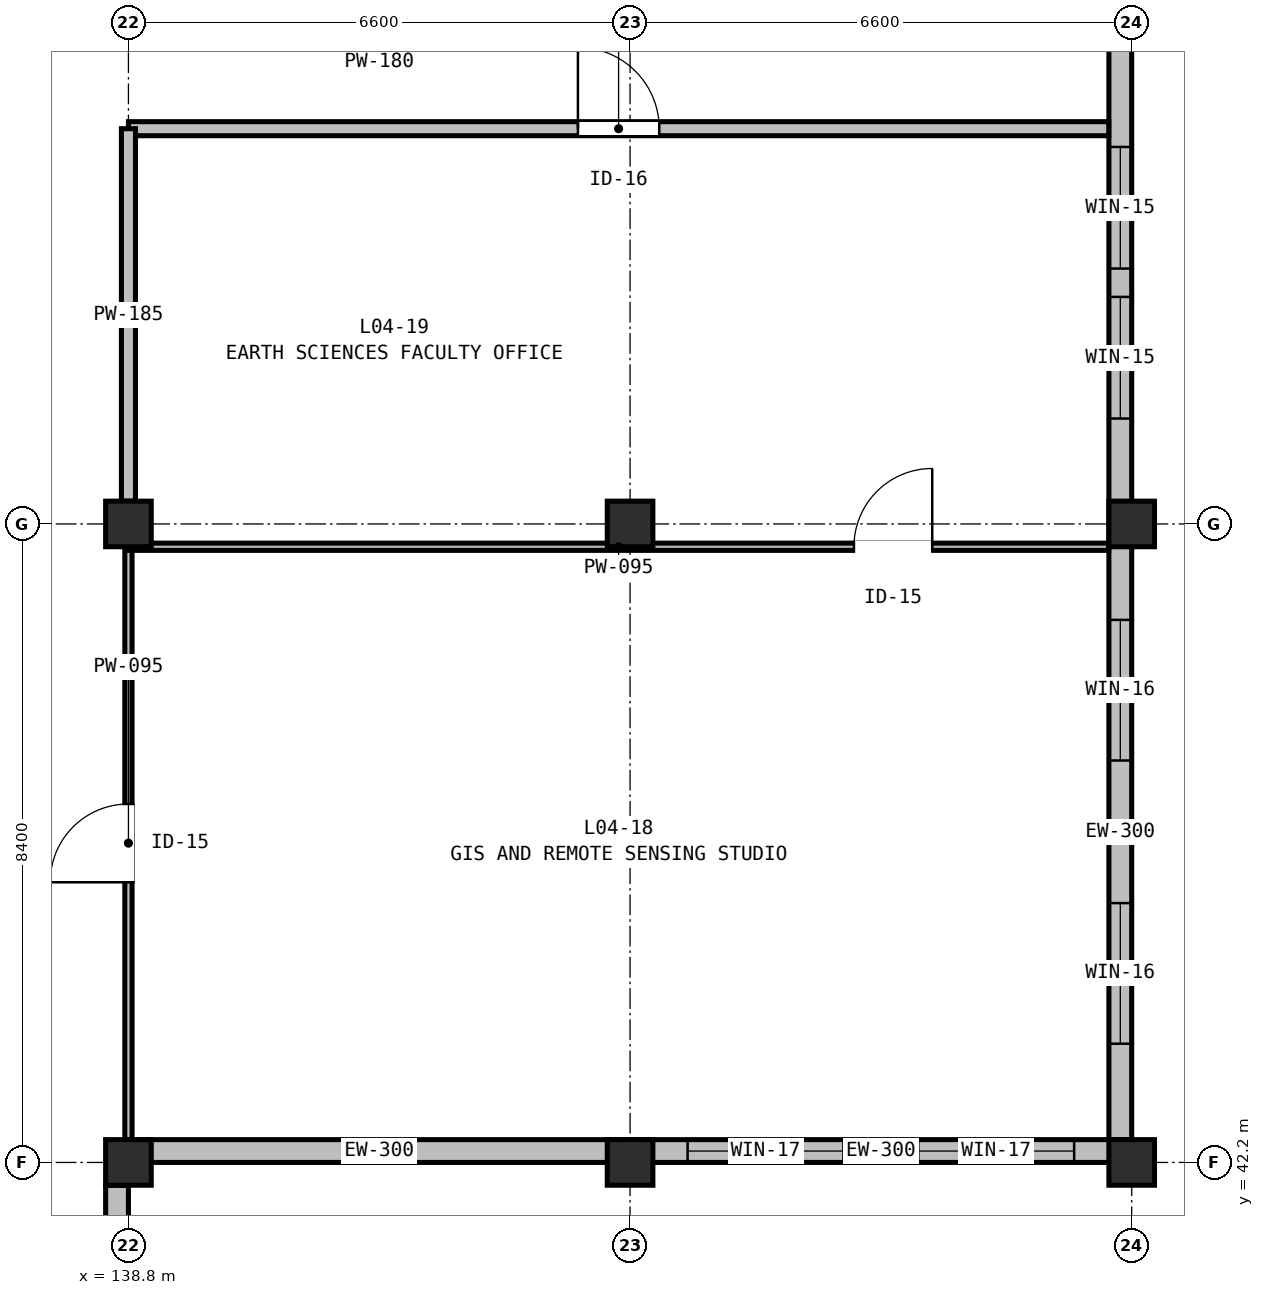
"""IFC4 building model, lengths in metres.
Left out: names, types, materials, properties, quantities, classifications, styles, units other than length and angle.
Written with IfcOpenShell. Run it as: python <this file> out.ifc"""

import sys

from ifc_helpers import new_model, si_unit, direction, frame, frame_2d, origin, origin_2d, place, context, subcontext, project, spatial, rectangle, extrude, element, fill, save


model = new_model("IFC4")
c1 = context("Model", 3, precision=1e-05, world=origin(), true_north=direction((0.0, 1.0)))
c2 = subcontext(c1, "Body", "Model", "MODEL_VIEW")
j1 = project(units=[si_unit("LENGTHUNIT", "METRE"), si_unit("PLANEANGLEUNIT", "RADIAN")], contexts=[c1])
p1 = place(None, origin())
s1 = spatial("IfcSite", under=j1, at=p1, CompositionType="ELEMENT")
p2 = place(p1, origin())
s2 = spatial("IfcBuilding", under=s1, at=p2, CompositionType="ELEMENT")
p3 = place(p2, frame((0.0, 0.0, 19.5)))
s3 = spatial("IfcBuildingStorey", under=s2, at=p3, CompositionType="ELEMENT", Elevation=19.5)
for number, where, z_axis, x_axis in (
    (1, (138.8, 42.2, 0.0), (0.0, 0.0, 1.0), (1.0, 0.0, 0.0)),
    (2, (138.8, 50.6, 0.0), (0.0, 0.0, 1.0), (1.0, 0.0, 0.0)),
    (3, (145.4, 42.2, 0.0), (0.0, 0.0, 1.0), (1.0, 0.0, 0.0)),
    (4, (145.4, 50.6, 0.0), (0.0, 0.0, 1.0), (1.0, 0.0, 0.0)),
    (5, (152.0, 42.2, 0.0), (0.0, 0.0, 1.0), (1.0, 0.0, 0.0)),
    (6, (152.0, 50.6, 0.0), (0.0, 0.0, 1.0), (1.0, 0.0, 0.0)),
):
    element("IfcColumn", number, at=place(p3, frame(where, z_axis=z_axis, x_axis=x_axis)), inside=s3, PredefinedType="COLUMN", context=c2, shape_type="SweptSolid", body=[
        extrude(rectangle(XDim=0.6, YDim=0.6, at=origin_2d()), origin(), (0.0, 0.0, 1.0), 4.5),
    ])
p4 = place(p3, frame((151.85, 58.7, 0.0), z_axis=(0.0, 0.0, 1.0), x_axis=(0.0, -1.0, 0.0)))
e7 = element("IfcWall", 7, at=p4, inside=s3, PredefinedType="STANDARD", context=c2, shape_type="SweptSolid", body=[
    extrude(rectangle(XDim=8.1, YDim=0.3, at=frame_2d((4.05, 0.0))), origin(), (0.0, 0.0, 1.0), 3.885),
])
p5 = place(p4, frame((3.14, 0.0, 0.9)))
e8 = element("IfcOpeningElement", 8, at=p5, cuts=e7, PredefinedType="OPENING", context=c2, shape_type="SweptSolid", body=[
    extrude(rectangle(XDim=1.6, YDim=1.6, at=frame_2d((0.8, 0.8))), frame((0.0, 0.16, 0.0), z_axis=(0.0, -1.0, 0.0), x_axis=(1.0, 0.0, 0.0)), (0.0, 0.0, 1.0), 0.32),
])
p6 = place(p4, frame((5.113, 0.0, 0.9)))
e9 = element("IfcOpeningElement", 9, at=p6, cuts=e7, PredefinedType="OPENING", context=c2, shape_type="SweptSolid", body=[
    extrude(rectangle(XDim=1.6, YDim=1.6, at=frame_2d((0.8, 0.8))), frame((0.0, 0.16, 0.0), z_axis=(0.0, -1.0, 0.0), x_axis=(1.0, 0.0, 0.0)), (0.0, 0.0, 1.0), 0.32),
])
p7 = place(p3, frame((151.85, 50.6, 0.0), z_axis=(0.0, 0.0, 1.0), x_axis=(0.0, -1.0, 0.0)))
e10 = element("IfcWall", 10, at=p7, inside=s3, PredefinedType="STANDARD", context=c2, shape_type="SweptSolid", body=[
    extrude(rectangle(XDim=8.1, YDim=0.3, at=frame_2d((4.05, 0.0))), origin(), (0.0, 0.0, 1.0), 3.885),
])
p8 = place(p7, frame((1.262, 0.0, 0.9)))
e11 = element("IfcOpeningElement", 11, at=p8, cuts=e10, PredefinedType="OPENING", context=c2, shape_type="SweptSolid", body=[
    extrude(rectangle(XDim=1.85, YDim=1.6, at=frame_2d((0.925, 0.8))), frame((0.0, 0.16, 0.0), z_axis=(0.0, -1.0, 0.0), x_axis=(1.0, 0.0, 0.0)), (0.0, 0.0, 1.0), 0.32),
])
p9 = place(p7, frame((4.988, 0.0, 0.9)))
e12 = element("IfcOpeningElement", 12, at=p9, cuts=e10, PredefinedType="OPENING", context=c2, shape_type="SweptSolid", body=[
    extrude(rectangle(XDim=1.85, YDim=1.6, at=frame_2d((0.925, 0.8))), frame((0.0, 0.16, 0.0), z_axis=(0.0, -1.0, 0.0), x_axis=(1.0, 0.0, 0.0)), (0.0, 0.0, 1.0), 0.32),
])
p10 = place(p3, frame((152.0, 42.35, 0.0), z_axis=(0.0, 0.0, 1.0), x_axis=(-1.0, 0.0, 0.0)))
e13 = element("IfcWall", 13, at=p10, inside=s3, PredefinedType="STANDARD", context=c2, shape_type="SweptSolid", body=[
    extrude(rectangle(XDim=6.6, YDim=0.3, at=frame_2d((3.3, 0.0))), origin(), (0.0, 0.0, 1.0), 3.735),
])
p11 = place(p10, frame((0.757, 0.0, 0.9)))
e14 = element("IfcOpeningElement", 14, at=p11, cuts=e13, PredefinedType="OPENING", context=c2, shape_type="SweptSolid", body=[
    extrude(rectangle(XDim=2.05, YDim=1.65, at=frame_2d((1.025, 0.825))), frame((0.0, 0.16, 0.0), z_axis=(0.0, -1.0, 0.0), x_axis=(1.0, 0.0, 0.0)), (0.0, 0.0, 1.0), 0.32),
])
p12 = place(p10, frame((3.793, 0.0, 0.9)))
e15 = element("IfcOpeningElement", 15, at=p12, cuts=e13, PredefinedType="OPENING", context=c2, shape_type="SweptSolid", body=[
    extrude(rectangle(XDim=2.05, YDim=1.65, at=frame_2d((1.025, 0.825))), frame((0.0, 0.16, 0.0), z_axis=(0.0, -1.0, 0.0), x_axis=(1.0, 0.0, 0.0)), (0.0, 0.0, 1.0), 0.32),
])
p13 = place(p3, frame((145.4, 42.35, 0.0), z_axis=(0.0, 0.0, 1.0), x_axis=(-1.0, 0.0, 0.0)))
e16 = element("IfcWall", 16, at=p13, inside=s3, PredefinedType="STANDARD", context=c2, shape_type="SweptSolid", body=[
    extrude(rectangle(XDim=6.6, YDim=0.3, at=frame_2d((3.3, 0.0))), origin(), (0.0, 0.0, 1.0), 3.735),
])
p14 = place(p3, frame((138.65, 41.9, 0.0), z_axis=(0.0, 0.0, 1.0), x_axis=(0.0, -1.0, 0.0)))
e17 = element("IfcWall", 17, at=p14, inside=s3, PredefinedType="STANDARD", context=c2, shape_type="SweptSolid", body=[
    extrude(rectangle(XDim=7.8, YDim=0.3, at=frame_2d((3.9, 0.0))), origin(), (0.0, 0.0, 1.0), 3.885),
])
p15 = place(p14, frame((1.456, 0.0, 0.75)))
e18 = element("IfcOpeningElement", 18, at=p15, cuts=e17, PredefinedType="OPENING", context=c2, shape_type="SweptSolid", body=[
    extrude(rectangle(XDim=1.3, YDim=2.4, at=frame_2d((0.65, 1.2))), frame((0.0, 0.16, 0.0), z_axis=(0.0, -1.0, 0.0), x_axis=(1.0, 0.0, 0.0)), (0.0, 0.0, 1.0), 0.32),
])
p16 = place(p14, frame((5.044, 0.0, 0.75)))
e19 = element("IfcOpeningElement", 19, at=p16, cuts=e17, PredefinedType="OPENING", context=c2, shape_type="SweptSolid", body=[
    extrude(rectangle(XDim=1.3, YDim=2.4, at=frame_2d((0.65, 1.2))), frame((0.0, 0.16, 0.0), z_axis=(0.0, -1.0, 0.0), x_axis=(1.0, 0.0, 0.0)), (0.0, 0.0, 1.0), 0.32),
])
p17 = place(p3, frame((138.8, 42.502, 0.0), z_axis=(0.0, 0.0, 1.0), x_axis=(0.0, 1.0, 0.0)))
e20 = element("IfcWall", 20, at=p17, inside=s3, PredefinedType="PARTITIONING", context=c2, shape_type="SweptSolid", body=[
    extrude(rectangle(XDim=7.798, YDim=0.095, at=frame_2d((3.899, 0.0))), origin(), (0.0, 0.0, 1.0), 3.735),
])
p18 = place(p17, frame((3.384, 0.0, 0.0)))
e21 = element("IfcOpeningElement", 21, at=p18, cuts=e20, PredefinedType="OPENING", context=c2, shape_type="SweptSolid", body=[
    extrude(rectangle(XDim=1.03, YDim=2.1, at=frame_2d((0.515, 1.05))), frame((0.0, 0.057, 0.0), z_axis=(0.0, -1.0, 0.0), x_axis=(1.0, 0.0, 0.0)), (0.0, 0.0, 1.0), 0.115),
])
p19 = place(p3, frame((138.8, 50.3, 0.0), z_axis=(0.0, 0.0, 1.0), x_axis=(1.0, 0.0, 0.0)))
e22 = element("IfcWall", 22, at=p19, inside=s3, PredefinedType="PARTITIONING", context=c2, shape_type="SweptSolid", body=[
    extrude(rectangle(XDim=12.898, YDim=0.095, at=frame_2d((6.449, 0.0))), origin(), (0.0, 0.0, 1.0), 3.735),
])
p20 = place(p19, frame((9.545, 0.0, 0.0)))
e23 = element("IfcOpeningElement", 23, at=p20, cuts=e22, PredefinedType="OPENING", context=c2, shape_type="SweptSolid", body=[
    extrude(rectangle(XDim=1.03, YDim=2.1, at=frame_2d((0.515, 1.05))), frame((0.0, 0.057, 0.0), z_axis=(0.0, -1.0, 0.0), x_axis=(1.0, 0.0, 0.0)), (0.0, 0.0, 1.0), 0.115),
])
p21 = place(p3, frame((138.8, 55.8, 0.0), z_axis=(0.0, 0.0, 1.0), x_axis=(1.0, 0.0, 0.0)))
e24 = element("IfcWall", 24, at=p21, inside=s3, PredefinedType="PARTITIONING", context=c2, shape_type="SweptSolid", body=[
    extrude(rectangle(XDim=12.898, YDim=0.185, at=frame_2d((6.449, 0.0))), origin(), (0.0, 0.0, 1.0), 3.735),
])
p22 = place(p21, frame((5.914, 0.0, 0.0)))
e25 = element("IfcOpeningElement", 25, at=p22, cuts=e24, PredefinedType="OPENING", context=c2, shape_type="SweptSolid", body=[
    extrude(rectangle(XDim=1.07, YDim=2.1, at=frame_2d((0.535, 1.05))), frame((0.0, 0.103, 0.0), z_axis=(0.0, -1.0, 0.0), x_axis=(1.0, 0.0, 0.0)), (0.0, 0.0, 1.0), 0.205),
])
p23 = place(p3, frame((138.8, 50.9, 0.0), z_axis=(0.0, 0.0, 1.0), x_axis=(0.0, 1.0, 0.0)))
e26 = element("IfcWall", 26, at=p23, inside=s3, PredefinedType="PARTITIONING", context=c2, shape_type="SweptSolid", body=[
    extrude(rectangle(XDim=4.9, YDim=0.185, at=frame_2d((2.45, 0.0))), origin(), (0.0, 0.0, 1.0), 3.735),
])
p24 = place(p5, origin())
e27 = element("IfcWindow", 27, at=p24, inside=s3, PartitioningType="SINGLE_PANEL", PredefinedType="WINDOW", context=c2, shape_type="SweptSolid", body=[
    extrude(rectangle(XDim=1.6, YDim=1.6, at=frame_2d((0.8, 0.8))), frame((0.0, 0.03, 0.0), z_axis=(0.0, -1.0, 0.0), x_axis=(1.0, 0.0, 0.0)), (0.0, 0.0, 1.0), 0.06),
])
fill(e8, e27)
p25 = place(p6, origin())
e28 = element("IfcWindow", 28, at=p25, inside=s3, PartitioningType="SINGLE_PANEL", PredefinedType="WINDOW", context=c2, shape_type="SweptSolid", body=[
    extrude(rectangle(XDim=1.6, YDim=1.6, at=frame_2d((0.8, 0.8))), frame((0.0, 0.03, 0.0), z_axis=(0.0, -1.0, 0.0), x_axis=(1.0, 0.0, 0.0)), (0.0, 0.0, 1.0), 0.06),
])
fill(e9, e28)
p26 = place(p8, origin())
e29 = element("IfcWindow", 29, at=p26, inside=s3, PartitioningType="SINGLE_PANEL", PredefinedType="WINDOW", context=c2, shape_type="SweptSolid", body=[
    extrude(rectangle(XDim=1.85, YDim=1.6, at=frame_2d((0.925, 0.8))), frame((0.0, 0.03, 0.0), z_axis=(0.0, -1.0, 0.0), x_axis=(1.0, 0.0, 0.0)), (0.0, 0.0, 1.0), 0.06),
])
fill(e11, e29)
p27 = place(p9, origin())
e30 = element("IfcWindow", 30, at=p27, inside=s3, PartitioningType="SINGLE_PANEL", PredefinedType="WINDOW", context=c2, shape_type="SweptSolid", body=[
    extrude(rectangle(XDim=1.85, YDim=1.6, at=frame_2d((0.925, 0.8))), frame((0.0, 0.03, 0.0), z_axis=(0.0, -1.0, 0.0), x_axis=(1.0, 0.0, 0.0)), (0.0, 0.0, 1.0), 0.06),
])
fill(e12, e30)
p28 = place(p11, origin())
e31 = element("IfcWindow", 31, at=p28, inside=s3, PartitioningType="SINGLE_PANEL", PredefinedType="WINDOW", context=c2, shape_type="SweptSolid", body=[
    extrude(rectangle(XDim=2.05, YDim=1.65, at=frame_2d((1.025, 0.825))), frame((0.0, 0.03, 0.0), z_axis=(0.0, -1.0, 0.0), x_axis=(1.0, 0.0, 0.0)), (0.0, 0.0, 1.0), 0.06),
])
fill(e14, e31)
p29 = place(p12, origin())
e32 = element("IfcWindow", 32, at=p29, inside=s3, PartitioningType="SINGLE_PANEL", PredefinedType="WINDOW", context=c2, shape_type="SweptSolid", body=[
    extrude(rectangle(XDim=2.05, YDim=1.65, at=frame_2d((1.025, 0.825))), frame((0.0, 0.03, 0.0), z_axis=(0.0, -1.0, 0.0), x_axis=(1.0, 0.0, 0.0)), (0.0, 0.0, 1.0), 0.06),
])
fill(e15, e32)
p30 = place(p18, origin())
e33 = element("IfcDoor", 33, at=p30, inside=s3, OperationType="SINGLE_SWING_LEFT", PredefinedType="DOOR", context=c2, shape_type="SweptSolid", body=[
    extrude(rectangle(XDim=1.03, YDim=2.1, at=frame_2d((0.515, 1.05))), frame((0.0, 0.025, 0.0), z_axis=(0.0, -1.0, 0.0), x_axis=(1.0, 0.0, 0.0)), (0.0, 0.0, 1.0), 0.05),
])
fill(e21, e33)
p31 = place(p20, origin())
e34 = element("IfcDoor", 34, at=p31, inside=s3, OperationType="SINGLE_SWING_RIGHT", PredefinedType="DOOR", context=c2, shape_type="SweptSolid", body=[
    extrude(rectangle(XDim=1.03, YDim=2.1, at=frame_2d((0.515, 1.05))), frame((0.0, 0.025, 0.0), z_axis=(0.0, -1.0, 0.0), x_axis=(1.0, 0.0, 0.0)), (0.0, 0.0, 1.0), 0.05),
])
fill(e23, e34)
p32 = place(p22, origin())
e35 = element("IfcDoor", 35, at=p32, inside=s3, OperationType="SINGLE_SWING_LEFT", PredefinedType="DOOR", context=c2, shape_type="SweptSolid", body=[
    extrude(rectangle(XDim=1.07, YDim=2.1, at=frame_2d((0.535, 1.05))), frame((0.0, 0.025, 0.0), z_axis=(0.0, -1.0, 0.0), x_axis=(1.0, 0.0, 0.0)), (0.0, 0.0, 1.0), 0.05),
])
fill(e25, e35)
save(model, sys.argv[1])
